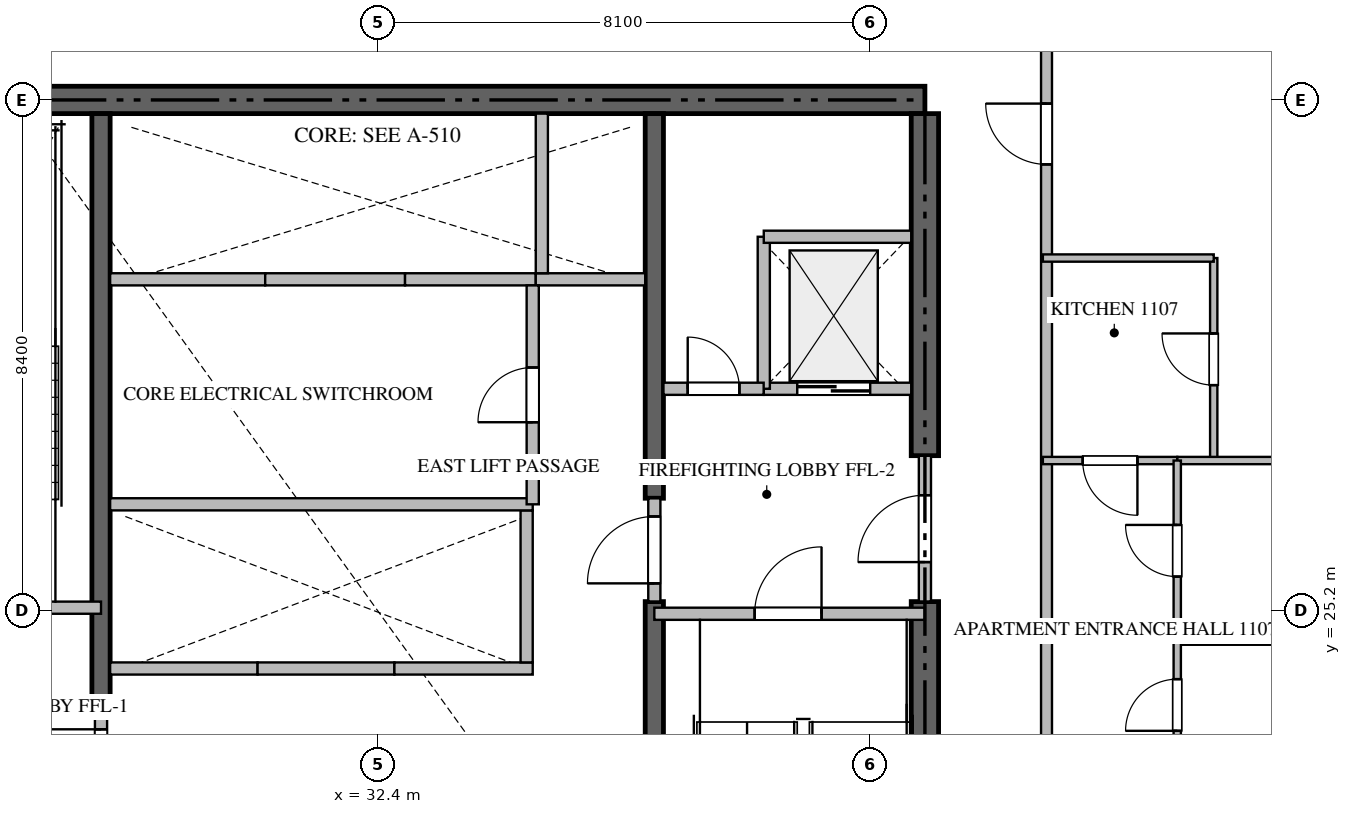
"""IFC4 building model, lengths in metres.
Left out: names, types, materials, properties, quantities, classifications, styles, units other than length and angle.
Written with IfcOpenShell. Run it as: python <this file> out.ifc"""

import sys

from ifc_helpers import new_model, si_unit, direction, frame, frame_2d, origin, place, context, subcontext, project, spatial, rectangle, extrude, source, transform, mapped, element, fill, save


model = new_model("IFC4")
c1 = context("Model", 3, precision=1e-05, world=origin(), true_north=direction((0.0, 1.0)))
c2 = subcontext(c1, "Body", "Model", "MODEL_VIEW")
j1 = project(units=[si_unit("LENGTHUNIT", "METRE"), si_unit("PLANEANGLEUNIT", "RADIAN")], contexts=[c1])
p1 = place(None, origin())
s1 = spatial("IfcSite", under=j1, at=p1, CompositionType="ELEMENT")
p2 = place(p1, origin())
s2 = spatial("IfcBuilding", under=s1, at=p2, CompositionType="ELEMENT")
p3 = place(p2, frame((0.0, 0.0, 49.2)))
s3 = spatial("IfcBuildingStorey", under=s2, at=p3, CompositionType="ELEMENT", Elevation=49.2)
p4 = place(p3, frame((41.4, 33.6, -0.26), z_axis=(0.0, 0.0, 1.0), x_axis=(-1.0, 0.0, 0.0)))
e1 = element("IfcWall", 1, at=p4, inside=s3, PredefinedType="SHEAR", context=c2, shape_type="SweptSolid", body=[
    extrude(rectangle(XDim=18.0, YDim=0.45, at=frame_2d((9.0, 0.0))), origin(), (0.0, 0.0, 1.0), 3.748),
])
p5 = place(p3, frame((41.4, 17.025, -0.26), z_axis=(0.0, 0.0, 1.0), x_axis=(0.0, 1.0, 0.0)))
e2 = element("IfcWall", 2, at=p5, inside=s3, PredefinedType="SHEAR", context=c2, shape_type="SweptSolid", body=[
    extrude(rectangle(XDim=8.325, YDim=0.45, at=frame_2d((4.163, 0.0))), origin(), (0.0, 0.0, 1.0), 3.748),
])
p6 = place(p3, frame((41.4, 27.75, -0.26), z_axis=(0.0, 0.0, 1.0), x_axis=(0.0, 1.0, 0.0)))
e3 = element("IfcWall", 3, at=p6, inside=s3, PredefinedType="SHEAR", context=c2, shape_type="SweptSolid", body=[
    extrude(rectangle(XDim=5.625, YDim=0.45, at=frame_2d((2.812, 0.0))), origin(), (0.0, 0.0, 1.0), 3.748),
])
p7 = place(p3, frame((27.85, 23.55, -0.26), z_axis=(0.0, 0.0, 1.0), x_axis=(0.0, 1.0, 0.0)))
e4 = element("IfcWall", 4, at=p7, inside=s3, PredefinedType="SHEAR", context=c2, shape_type="SweptSolid", body=[
    extrude(rectangle(XDim=9.825, YDim=0.3, at=frame_2d((4.913, 0.0))), origin(), (0.0, 0.0, 1.0), 3.748),
])
p8 = place(p3, frame((36.95, 17.025, -0.26), z_axis=(0.0, 0.0, 1.0), x_axis=(0.0, 1.0, 0.0)))
e5 = element("IfcWall", 5, at=p8, inside=s3, PredefinedType="SHEAR", context=c2, shape_type="SweptSolid", body=[
    extrude(rectangle(XDim=8.325, YDim=0.3, at=frame_2d((4.163, 0.0))), origin(), (0.0, 0.0, 1.0), 3.748),
])
p9 = place(p3, frame((36.95, 27.05, -0.26), z_axis=(0.0, 0.0, 1.0), x_axis=(0.0, 1.0, 0.0)))
e6 = element("IfcWall", 6, at=p9, inside=s3, PredefinedType="SHEAR", context=c2, shape_type="SweptSolid", body=[
    extrude(rectangle(XDim=6.325, YDim=0.3, at=frame_2d((3.163, 0.0))), origin(), (0.0, 0.0, 1.0), 3.748),
])
p10 = place(p3, frame((23.4, 25.25, 0.0), z_axis=(0.0, 0.0, 1.0), x_axis=(1.0, 0.0, 0.0)))
e7 = element("IfcWall", 7, at=p10, inside=s3, PredefinedType="STANDARD", context=c2, shape_type="SweptSolid", body=[
    extrude(rectangle(XDim=4.45, YDim=0.2, at=frame_2d((2.225, 0.0))), origin(), (0.0, 0.0, 1.0), 3.49),
])
p11 = place(p10, frame((1.65, 0.0, 0.0)))
e8 = element("IfcOpeningElement", 8, at=p11, cuts=e7, PredefinedType="OPENING", context=c2, shape_type="SweptSolid", body=[
    extrude(rectangle(XDim=1.1, YDim=2.15, at=frame_2d((0.55, 1.075))), frame((0.0, 0.11, 0.0), z_axis=(0.0, -1.0, 0.0), x_axis=(1.0, 0.0, 0.0)), (0.0, 0.0, 1.0), 0.22),
])
p12 = place(p3, frame((36.95, 25.15, 0.0), z_axis=(0.0, 0.0, 1.0), x_axis=(1.0, 0.0, 0.0)))
e9 = element("IfcWall", 9, at=p12, inside=s3, PredefinedType="STANDARD", context=c2, shape_type="SweptSolid", body=[
    extrude(rectangle(XDim=4.45, YDim=0.2, at=frame_2d((2.225, 0.0))), origin(), (0.0, 0.0, 1.0), 3.49),
])
p13 = place(p12, frame((1.65, 0.0, 0.0)))
e10 = element("IfcOpeningElement", 10, at=p13, cuts=e9, PredefinedType="OPENING", context=c2, shape_type="SweptSolid", body=[
    extrude(rectangle(XDim=1.1, YDim=2.15, at=frame_2d((0.55, 1.075))), frame((0.0, 0.11, 0.0), z_axis=(0.0, -1.0, 0.0), x_axis=(1.0, 0.0, 0.0)), (0.0, 0.0, 1.0), 0.22),
])
p14 = place(p3, frame((38.75, 28.85, 0.0), z_axis=(0.0, 0.0, 1.0), x_axis=(1.0, 0.0, 0.0)))
e11 = element("IfcWall", 11, at=p14, inside=s3, PredefinedType="STANDARD", context=c2, shape_type="SweptSolid", body=[
    extrude(rectangle(XDim=2.425, YDim=0.2, at=frame_2d((1.212, 0.0))), origin(), (0.0, 0.0, 1.0), 3.49),
])
p15 = place(p14, frame((0.55, 0.0, 0.0)))
e12 = element("IfcOpeningElement", 12, at=p15, cuts=e11, PredefinedType="OPENING", context=c2, shape_type="SweptSolid", body=[
    extrude(rectangle(XDim=1.2, YDim=2.2, at=frame_2d((0.6, 1.1))), frame((0.0, 0.11, 0.0), z_axis=(0.0, -1.0, 0.0), x_axis=(1.0, 0.0, 0.0)), (0.0, 0.0, 1.0), 0.22),
])
p16 = place(p3, frame((28.0, 24.25, 0.0), z_axis=(0.0, 0.0, 1.0), x_axis=(1.0, 0.0, 0.0)))
e13 = element("IfcWall", 13, at=p16, inside=s3, PredefinedType="STANDARD", context=c2, shape_type="SweptSolid", body=[
    extrude(rectangle(XDim=2.425, YDim=0.2, at=frame_2d((1.212, 0.0))), origin(), (0.0, 0.0, 1.0), 3.49),
])
p17 = place(p3, frame((30.425, 24.25, 0.0), z_axis=(0.0, 0.0, 1.0), x_axis=(1.0, 0.0, 0.0)))
e14 = element("IfcWall", 14, at=p17, inside=s3, PredefinedType="STANDARD", context=c2, shape_type="SweptSolid", body=[
    extrude(rectangle(XDim=2.25, YDim=0.2, at=frame_2d((1.125, 0.0))), origin(), (0.0, 0.0, 1.0), 3.49),
])
p18 = place(p3, frame((32.675, 24.25, 0.0), z_axis=(0.0, 0.0, 1.0), x_axis=(1.0, 0.0, 0.0)))
e15 = element("IfcWall", 15, at=p18, inside=s3, PredefinedType="STANDARD", context=c2, shape_type="SweptSolid", body=[
    extrude(rectangle(XDim=2.275, YDim=0.2, at=frame_2d((1.137, 0.0))), origin(), (0.0, 0.0, 1.0), 3.49),
])
p19 = place(p3, frame((34.85, 24.35, 0.0), z_axis=(0.0, 0.0, 1.0), x_axis=(0.0, 1.0, 0.0)))
e16 = element("IfcWall", 16, at=p19, inside=s3, PredefinedType="STANDARD", context=c2, shape_type="SweptSolid", body=[
    extrude(rectangle(XDim=2.5, YDim=0.2, at=frame_2d((1.25, 0.0))), origin(), (0.0, 0.0, 1.0), 3.49),
])
p20 = place(p3, frame((28.0, 30.65, 0.0), z_axis=(0.0, 0.0, 1.0), x_axis=(1.0, 0.0, 0.0)))
e17 = element("IfcWall", 17, at=p20, inside=s3, PredefinedType="STANDARD", context=c2, shape_type="SweptSolid", body=[
    extrude(rectangle(XDim=2.55, YDim=0.2, at=frame_2d((1.275, 0.0))), origin(), (0.0, 0.0, 1.0), 3.49),
])
p21 = place(p3, frame((30.55, 30.65, 0.0), z_axis=(0.0, 0.0, 1.0), x_axis=(1.0, 0.0, 0.0)))
e18 = element("IfcWall", 18, at=p21, inside=s3, PredefinedType="STANDARD", context=c2, shape_type="SweptSolid", body=[
    extrude(rectangle(XDim=2.3, YDim=0.2, at=frame_2d((1.15, 0.0))), origin(), (0.0, 0.0, 1.0), 3.49),
])
p22 = place(p3, frame((32.85, 30.65, 0.0), z_axis=(0.0, 0.0, 1.0), x_axis=(1.0, 0.0, 0.0)))
e19 = element("IfcWall", 19, at=p22, inside=s3, PredefinedType="STANDARD", context=c2, shape_type="SweptSolid", body=[
    extrude(rectangle(XDim=2.15, YDim=0.2, at=frame_2d((1.075, 0.0))), origin(), (0.0, 0.0, 1.0), 3.49),
])
p23 = place(p3, frame((35.0, 30.65, 0.0), z_axis=(0.0, 0.0, 1.0), x_axis=(1.0, 0.0, 0.0)))
e20 = element("IfcWall", 20, at=p23, inside=s3, PredefinedType="STANDARD", context=c2, shape_type="SweptSolid", body=[
    extrude(rectangle(XDim=1.8, YDim=0.2, at=frame_2d((0.9, 0.0))), origin(), (0.0, 0.0, 1.0), 3.49),
])
p24 = place(p3, frame((35.1, 30.75, 0.0), z_axis=(0.0, 0.0, 1.0), x_axis=(0.0, 1.0, 0.0)))
e21 = element("IfcWall", 21, at=p24, inside=s3, PredefinedType="STANDARD", context=c2, shape_type="SweptSolid", body=[
    extrude(rectangle(XDim=2.625, YDim=0.2, at=frame_2d((1.312, 0.0))), origin(), (0.0, 0.0, 1.0), 3.49),
])
p25 = place(p3, frame((38.75, 28.85, 0.0), z_axis=(0.0, 0.0, 1.0), x_axis=(0.0, 1.0, 0.0)))
e22 = element("IfcWall", 22, at=p25, inside=s3, PredefinedType="STANDARD", context=c2, shape_type="SweptSolid", body=[
    extrude(rectangle(XDim=2.5, YDim=0.2, at=frame_2d((1.25, 0.0))), origin(), (0.0, 0.0, 1.0), 3.49),
])
p26 = place(p3, frame((38.75, 31.35, 0.0), z_axis=(0.0, 0.0, 1.0), x_axis=(1.0, 0.0, 0.0)))
e23 = element("IfcWall", 23, at=p26, inside=s3, PredefinedType="STANDARD", context=c2, shape_type="SweptSolid", body=[
    extrude(rectangle(XDim=2.425, YDim=0.2, at=frame_2d((1.212, 0.0))), origin(), (0.0, 0.0, 1.0), 3.49),
])
p27 = place(p3, frame((37.1, 28.85, 0.0), z_axis=(0.0, 0.0, 1.0), x_axis=(1.0, 0.0, 0.0)))
e24 = element("IfcWall", 24, at=p27, inside=s3, PredefinedType="STANDARD", context=c2, shape_type="SweptSolid", body=[
    extrude(rectangle(XDim=1.648, YDim=0.2, at=frame_2d((0.824, 0.0))), origin(), (0.0, 0.0, 1.0), 3.49),
])
p28 = place(p27, frame((0.399, 0.0, 0.0)))
e25 = element("IfcOpeningElement", 25, at=p28, cuts=e24, PredefinedType="OPENING", context=c2, shape_type="SweptSolid", body=[
    extrude(rectangle(XDim=0.85, YDim=2.1, at=frame_2d((0.425, 1.05))), frame((0.0, 0.11, 0.0), z_axis=(0.0, -1.0, 0.0), x_axis=(1.0, 0.0, 0.0)), (0.0, 0.0, 1.0), 0.22),
])
p29 = place(p3, frame((41.4, 25.352, 0.0), z_axis=(0.0, 0.0, 1.0), x_axis=(0.0, 1.0, 0.0)))
e26 = element("IfcWall", 26, at=p29, inside=s3, PredefinedType="STANDARD", context=c2, shape_type="SweptSolid", body=[
    extrude(rectangle(XDim=2.396, YDim=0.2, at=frame_2d((1.198, 0.0))), origin(), (0.0, 0.0, 1.0), 3.49),
])
p30 = place(p29, frame((0.648, 0.0, 0.0)))
e27 = element("IfcOpeningElement", 27, at=p30, cuts=e26, PredefinedType="OPENING", context=c2, shape_type="SweptSolid", body=[
    extrude(rectangle(XDim=1.1, YDim=2.15, at=frame_2d((0.55, 1.075))), frame((0.0, 0.11, 0.0), z_axis=(0.0, -1.0, 0.0), x_axis=(1.0, 0.0, 0.0)), (0.0, 0.0, 1.0), 0.22),
])
p31 = place(p3, frame((27.85, 21.852, 0.0), z_axis=(0.0, 0.0, 1.0), x_axis=(0.0, 1.0, 0.0)))
e28 = element("IfcWall", 28, at=p31, inside=s3, PredefinedType="STANDARD", context=c2, shape_type="SweptSolid", body=[
    extrude(rectangle(XDim=1.696, YDim=0.2, at=frame_2d((0.848, 0.0))), origin(), (0.0, 0.0, 1.0), 3.49),
])
p32 = place(p31, frame((0.298, 0.0, 0.0)))
e29 = element("IfcOpeningElement", 29, at=p32, cuts=e28, PredefinedType="OPENING", context=c2, shape_type="SweptSolid", body=[
    extrude(rectangle(XDim=1.1, YDim=2.15, at=frame_2d((0.55, 1.075))), frame((0.0, 0.11, 0.0), z_axis=(0.0, -1.0, 0.0), x_axis=(1.0, 0.0, 0.0)), (0.0, 0.0, 1.0), 0.22),
])
p33 = place(p3, frame((36.95, 25.352, 0.0), z_axis=(0.0, 0.0, 1.0), x_axis=(0.0, 1.0, 0.0)))
e30 = element("IfcWall", 30, at=p33, inside=s3, PredefinedType="STANDARD", context=c2, shape_type="SweptSolid", body=[
    extrude(rectangle(XDim=1.696, YDim=0.2, at=frame_2d((0.848, 0.0))), origin(), (0.0, 0.0, 1.0), 3.49),
])
p34 = place(p33, frame((0.298, 0.0, 0.0)))
e31 = element("IfcOpeningElement", 31, at=p34, cuts=e30, PredefinedType="OPENING", context=c2, shape_type="SweptSolid", body=[
    extrude(rectangle(XDim=1.1, YDim=2.15, at=frame_2d((0.55, 1.075))), frame((0.0, 0.11, 0.0), z_axis=(0.0, -1.0, 0.0), x_axis=(1.0, 0.0, 0.0)), (0.0, 0.0, 1.0), 0.22),
])
p35 = place(p3, frame((28.0, 26.95, 0.0), z_axis=(0.0, 0.0, 1.0), x_axis=(1.0, 0.0, 0.0)))
e32 = element("IfcWall", 32, at=p35, inside=s3, PredefinedType="STANDARD", context=c2, shape_type="SweptSolid", body=[
    extrude(rectangle(XDim=6.95, YDim=0.2, at=frame_2d((3.475, 0.0))), origin(), (0.0, 0.0, 1.0), 3.49),
])
p36 = place(p3, frame((34.95, 26.95, 0.0), z_axis=(0.0, 0.0, 1.0), x_axis=(0.0, 1.0, 0.0)))
e33 = element("IfcWall", 33, at=p36, inside=s3, PredefinedType="STANDARD", context=c2, shape_type="SweptSolid", body=[
    extrude(rectangle(XDim=3.6, YDim=0.2, at=frame_2d((1.8, 0.0))), origin(), (0.0, 0.0, 1.0), 3.49),
])
p37 = place(p36, frame((1.35, 0.0, 0.0)))
e34 = element("IfcOpeningElement", 34, at=p37, cuts=e33, PredefinedType="OPENING", context=c2, shape_type="SweptSolid", body=[
    extrude(rectangle(XDim=0.9, YDim=2.1, at=frame_2d((0.45, 1.05))), frame((0.0, 0.11, 0.0), z_axis=(0.0, -1.0, 0.0), x_axis=(1.0, 0.0, 0.0)), (0.0, 0.0, 1.0), 0.22),
])
p38 = place(p3, frame((43.4, 14.9, 0.0), z_axis=(0.0, 0.0, 1.0), x_axis=(0.0, 1.0, 0.0)))
e35 = element("IfcWall", 35, at=p38, inside=s3, PredefinedType="PARTITIONING", context=c2, shape_type="SweptSolid", body=[
    extrude(rectangle(XDim=20.6, YDim=0.18, at=frame_2d((10.3, 0.0))), origin(), (0.0, 0.0, 1.0), 3.49),
])
p39 = place(p38, frame((17.64, 0.0, 0.0)))
e36 = element("IfcOpeningElement", 36, at=p39, cuts=e35, PredefinedType="OPENING", context=c2, shape_type="SweptSolid", body=[
    extrude(rectangle(XDim=1.0, YDim=2.15, at=frame_2d((0.5, 1.075))), frame((0.0, 0.1, 0.0), z_axis=(0.0, -1.0, 0.0), x_axis=(1.0, 0.0, 0.0)), (0.0, 0.0, 1.0), 0.2),
])
p40 = place(p3, frame((46.15, 27.67, 0.0), z_axis=(0.0, 0.0, 1.0), x_axis=(0.0, 1.0, 0.0)))
e37 = element("IfcWall", 37, at=p40, inside=s3, PredefinedType="PARTITIONING", context=c2, shape_type="SweptSolid", body=[
    extrude(rectangle(XDim=3.33, YDim=0.12, at=frame_2d((1.665, 0.0))), origin(), (0.0, 0.0, 1.0), 3.49),
])
p41 = place(p40, frame((1.24, 0.0, 0.0)))
e38 = element("IfcOpeningElement", 38, at=p41, cuts=e37, PredefinedType="OPENING", context=c2, shape_type="SweptSolid", body=[
    extrude(rectangle(XDim=0.85, YDim=2.1, at=frame_2d((0.425, 1.05))), frame((0.0, 0.07, 0.0), z_axis=(0.0, -1.0, 0.0), x_axis=(1.0, 0.0, 0.0)), (0.0, 0.0, 1.0), 0.14),
])
p42 = place(p3, frame((46.15, 31.0, 0.0), z_axis=(0.0, 0.0, 1.0), x_axis=(-1.0, 0.0, 0.0)))
e39 = element("IfcWall", 39, at=p42, inside=s3, PredefinedType="PARTITIONING", context=c2, shape_type="SweptSolid", body=[
    extrude(rectangle(XDim=2.81, YDim=0.12, at=frame_2d((1.405, 0.0))), origin(), (0.0, 0.0, 1.0), 3.49),
])
p43 = place(p3, frame((45.55, 27.67, 0.0), z_axis=(0.0, 0.0, 1.0), x_axis=(-1.0, 0.0, 0.0)))
e40 = element("IfcWall", 40, at=p43, inside=s3, PredefinedType="PARTITIONING", context=c2, shape_type="SweptSolid", body=[
    extrude(rectangle(XDim=2.21, YDim=0.12, at=frame_2d((1.105, 0.0))), origin(), (0.0, 0.0, 1.0), 3.49),
])
p44 = place(p43, frame((0.655, 0.0, 0.0)))
e41 = element("IfcOpeningElement", 41, at=p44, cuts=e40, PredefinedType="OPENING", context=c2, shape_type="SweptSolid", body=[
    extrude(rectangle(XDim=0.9, YDim=2.1, at=frame_2d((0.45, 1.05))), frame((0.0, 0.07, 0.0), z_axis=(0.0, -1.0, 0.0), x_axis=(1.0, 0.0, 0.0)), (0.0, 0.0, 1.0), 0.14),
])
p45 = place(p3, frame((54.679, 27.67, 0.0), z_axis=(0.0, 0.0, 1.0), x_axis=(-1.0, 0.0, 0.0)))
e42 = element("IfcWall", 42, at=p45, inside=s3, PredefinedType="PARTITIONING", context=c2, shape_type="SweptSolid", body=[
    extrude(rectangle(XDim=9.127, YDim=0.12, at=frame_2d((4.563, 0.0))), origin(), (0.0, 0.0, 1.0), 3.49),
])
p46 = place(p3, frame((54.681, 24.7, 0.0), z_axis=(0.0, 0.0, 1.0), x_axis=(-1.0, 0.0, 0.0)))
e43 = element("IfcWall", 43, at=p46, inside=s3, PredefinedType="PARTITIONING", context=c2, shape_type="SweptSolid", body=[
    extrude(rectangle(XDim=9.131, YDim=0.12, at=frame_2d((4.565, 0.0))), origin(), (0.0, 0.0, 1.0), 3.49),
])
p47 = place(p3, frame((45.55, 22.6, 0.0), z_axis=(0.0, 0.0, 1.0), x_axis=(0.0, 1.0, 0.0)))
e44 = element("IfcWall", 44, at=p47, inside=s3, PredefinedType="PARTITIONING", context=c2, shape_type="SweptSolid", body=[
    extrude(rectangle(XDim=2.1, YDim=0.12, at=frame_2d((1.05, 0.0))), origin(), (0.0, 0.0, 1.0), 3.49),
])
p48 = place(p47, frame((0.625, 0.0, 0.0)))
e45 = element("IfcOpeningElement", 45, at=p48, cuts=e44, PredefinedType="OPENING", context=c2, shape_type="SweptSolid", body=[
    extrude(rectangle(XDim=0.85, YDim=2.1, at=frame_2d((0.425, 1.05))), frame((0.0, 0.07, 0.0), z_axis=(0.0, -1.0, 0.0), x_axis=(1.0, 0.0, 0.0)), (0.0, 0.0, 1.0), 0.14),
])
p49 = place(p3, frame((45.55, 24.702, 0.0), z_axis=(0.0, 0.0, 1.0), x_axis=(0.0, 1.0, 0.0)))
e46 = element("IfcWall", 46, at=p49, inside=s3, PredefinedType="PARTITIONING", context=c2, shape_type="SweptSolid", body=[
    extrude(rectangle(XDim=2.968, YDim=0.12, at=frame_2d((1.484, 0.0))), origin(), (0.0, 0.0, 1.0), 3.49),
])
p50 = place(p49, frame((1.059, 0.0, 0.0)))
e47 = element("IfcOpeningElement", 47, at=p50, cuts=e46, PredefinedType="OPENING", context=c2, shape_type="SweptSolid", body=[
    extrude(rectangle(XDim=0.85, YDim=2.1, at=frame_2d((0.425, 1.05))), frame((0.0, 0.07, 0.0), z_axis=(0.0, -1.0, 0.0), x_axis=(1.0, 0.0, 0.0)), (0.0, 0.0, 1.0), 0.14),
])
m1 = source(origin(), c2, "Body", "SweptSolid", [
    extrude(rectangle(XDim=1.1, YDim=2.15, at=frame_2d((0.55, 1.075))), frame((0.0, 0.025, 0.0), z_axis=(0.0, -1.0, 0.0), x_axis=(1.0, 0.0, 0.0)), (0.0, 0.0, 1.0), 0.05),
])
p51 = place(p13, origin())
e48 = element("IfcDoor", 48, at=p51, inside=s3, OperationType="SINGLE_SWING_RIGHT", PredefinedType="DOOR", context=c2, shape_type="MappedRepresentation", body=[
    mapped(m1, transform((0.0, 0.0, 0.0), scale=1.0)),
])
fill(e10, e48)
m2 = source(origin(), c2, "Body", "SweptSolid", [
    extrude(rectangle(XDim=1.2, YDim=2.2, at=frame_2d((0.6, 1.1))), frame((0.0, 0.025, 0.0), z_axis=(0.0, -1.0, 0.0), x_axis=(1.0, 0.0, 0.0)), (0.0, 0.0, 1.0), 0.05),
])
p52 = place(p15, origin())
e49 = element("IfcDoor", 49, at=p52, inside=s3, OperationType="DOUBLE_DOOR_SLIDING", PredefinedType="DOOR", context=c2, shape_type="MappedRepresentation", body=[
    mapped(m2, transform((0.0, 0.0, 0.0), scale=1.0)),
])
fill(e12, e49)
m3 = source(origin(), c2, "Body", "SweptSolid", [
    extrude(rectangle(XDim=0.85, YDim=2.1, at=frame_2d((0.425, 1.05))), frame((0.0, 0.025, 0.0), z_axis=(0.0, -1.0, 0.0), x_axis=(1.0, 0.0, 0.0)), (0.0, 0.0, 1.0), 0.05),
])
p53 = place(p28, origin())
e50 = element("IfcDoor", 50, at=p53, inside=s3, OperationType="SINGLE_SWING_LEFT", PredefinedType="DOOR", context=c2, shape_type="MappedRepresentation", body=[
    mapped(m3, transform((0.0, 0.0, 0.0), scale=1.0)),
])
fill(e25, e50)
p54 = place(p30, origin())
e51 = element("IfcDoor", 51, at=p54, inside=s3, OperationType="SINGLE_SWING_LEFT", PredefinedType="DOOR", context=c2, shape_type="MappedRepresentation", body=[
    mapped(m1, transform((0.0, 0.0, 0.0), scale=1.0)),
])
fill(e27, e51)
p55 = place(p32, origin())
e52 = element("IfcDoor", 52, at=p55, inside=s3, OperationType="SINGLE_SWING_RIGHT", PredefinedType="DOOR", context=c2, shape_type="MappedRepresentation", body=[
    mapped(m1, transform((0.0, 0.0, 0.0), scale=1.0)),
])
fill(e29, e52)
p56 = place(p34, origin())
e53 = element("IfcDoor", 53, at=p56, inside=s3, OperationType="SINGLE_SWING_LEFT", PredefinedType="DOOR", context=c2, shape_type="MappedRepresentation", body=[
    mapped(m1, transform((0.0, 0.0, 0.0), scale=1.0)),
])
fill(e31, e53)
m4 = source(origin(), c2, "Body", "SweptSolid", [
    extrude(rectangle(XDim=0.9, YDim=2.1, at=frame_2d((0.45, 1.05))), frame((0.0, 0.025, 0.0), z_axis=(0.0, -1.0, 0.0), x_axis=(1.0, 0.0, 0.0)), (0.0, 0.0, 1.0), 0.05),
])
p57 = place(p37, origin())
e54 = element("IfcDoor", 54, at=p57, inside=s3, OperationType="SINGLE_SWING_LEFT", PredefinedType="DOOR", context=c2, shape_type="MappedRepresentation", body=[
    mapped(m4, transform((0.0, 0.0, 0.0), scale=1.0)),
])
fill(e34, e54)
m5 = source(origin(), c2, "Body", "SweptSolid", [
    extrude(rectangle(XDim=1.0, YDim=2.15, at=frame_2d((0.5, 1.075))), frame((0.0, 0.025, 0.0), z_axis=(0.0, -1.0, 0.0), x_axis=(1.0, 0.0, 0.0)), (0.0, 0.0, 1.0), 0.05),
])
p58 = place(p39, origin())
e55 = element("IfcDoor", 55, at=p58, inside=s3, OperationType="SINGLE_SWING_RIGHT", PredefinedType="DOOR", context=c2, shape_type="MappedRepresentation", body=[
    mapped(m5, transform((0.0, 0.0, 0.0), scale=1.0)),
])
fill(e36, e55)
p59 = place(p41, origin())
e56 = element("IfcDoor", 56, at=p59, inside=s3, OperationType="SINGLE_SWING_RIGHT", PredefinedType="DOOR", context=c2, shape_type="MappedRepresentation", body=[
    mapped(m3, transform((0.0, 0.0, 0.0), scale=1.0)),
])
fill(e38, e56)
p60 = place(p44, origin())
e57 = element("IfcDoor", 57, at=p60, inside=s3, OperationType="SINGLE_SWING_LEFT", PredefinedType="DOOR", context=c2, shape_type="MappedRepresentation", body=[
    mapped(m4, transform((0.0, 0.0, 0.0), scale=1.0)),
])
fill(e41, e57)
p61 = place(p48, origin())
e58 = element("IfcDoor", 58, at=p61, inside=s3, OperationType="SINGLE_SWING_LEFT", PredefinedType="DOOR", context=c2, shape_type="MappedRepresentation", body=[
    mapped(m3, transform((0.0, 0.0, 0.0), scale=1.0)),
])
fill(e45, e58)
p62 = place(p50, origin())
e59 = element("IfcDoor", 59, at=p62, inside=s3, OperationType="SINGLE_SWING_RIGHT", PredefinedType="DOOR", context=c2, shape_type="MappedRepresentation", body=[
    mapped(m3, transform((0.0, 0.0, 0.0), scale=1.0)),
])
fill(e47, e59)
save(model, sys.argv[1])
